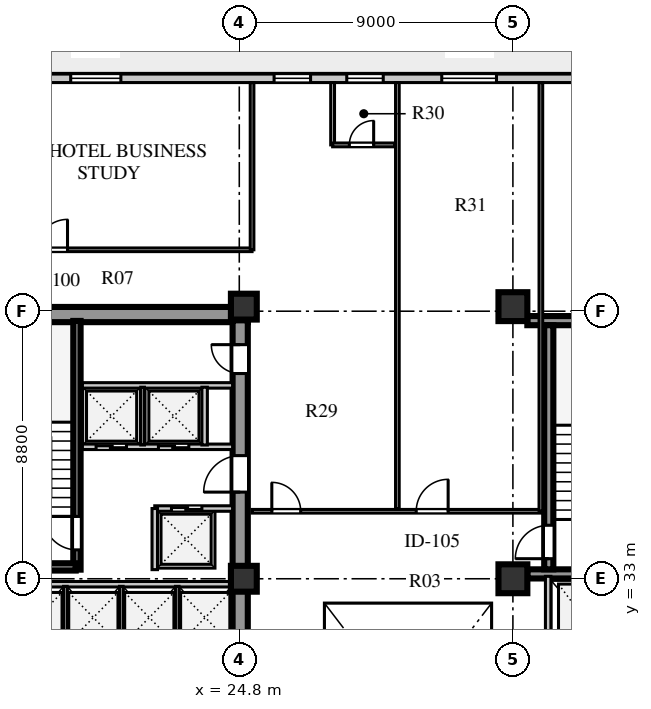
"""IFC4 building model, lengths in metres.
Left out: names, types, materials, properties, quantities, classifications, styles, units other than length and angle.
Written with IfcOpenShell. Run it as: python <this file> out.ifc"""

import sys

from ifc_helpers import new_model, si_unit, direction, frame, frame_2d, origin, origin_2d, place, context, subcontext, project, spatial, rectangle, extrude, element, fill, save


model = new_model("IFC4")
c1 = context("Model", 3, precision=1e-05, world=origin(), true_north=direction((0.0, 1.0)))
c2 = subcontext(c1, "Body", "Model", "MODEL_VIEW")
j1 = project(units=[si_unit("LENGTHUNIT", "METRE"), si_unit("PLANEANGLEUNIT", "RADIAN")], contexts=[c1])
p1 = place(None, origin())
s1 = spatial("IfcSite", under=j1, at=p1, CompositionType="ELEMENT")
p2 = place(p1, origin())
s2 = spatial("IfcBuilding", under=s1, at=p2, CompositionType="ELEMENT")
p3 = place(p2, frame((0.0, 0.0, 173.3)))
s3 = spatial("IfcBuildingStorey", under=s2, at=p3, CompositionType="ELEMENT", Elevation=173.3)
p4 = place(p3, frame((15.4, 41.69, 0.0), z_axis=(0.0, 0.0, 1.0), x_axis=(1.0, 0.0, 0.0)))
e1 = element("IfcWall", 1, at=p4, inside=s3, PredefinedType="SHEAR", context=c2, shape_type="SweptSolid", body=[
    extrude(rectangle(XDim=9.68, YDim=0.5, at=frame_2d((4.84, 0.0))), origin(), (0.0, 0.0, 1.0), 3.6),
])
p5 = place(p3, frame((24.83, 15.74, 0.0), z_axis=(0.0, 0.0, 1.0), x_axis=(0.0, 1.0, 0.0)))
e2 = element("IfcWall", 2, at=p5, inside=s3, PredefinedType="SHEAR", context=c2, shape_type="SweptSolid", body=[
    extrude(rectangle(XDim=25.76, YDim=0.5, at=frame_2d((12.88, 0.0))), origin(), (0.0, 0.0, 1.0), 3.6),
])
p6 = place(p5, frame((1.61, 0.0, 0.0)))
e3 = element("IfcOpeningElement", 3, at=p6, cuts=e2, PredefinedType="OPENING", context=c2, shape_type="SweptSolid", body=[
    extrude(rectangle(XDim=1.2, YDim=2.1, at=frame_2d((0.6, 1.05))), frame((0.0, 0.26, 0.0), z_axis=(0.0, -1.0, 0.0), x_axis=(1.0, 0.0, 0.0)), (0.0, 0.0, 1.0), 0.52),
])
p7 = place(p5, frame((6.78, 0.0, 0.0)))
e4 = element("IfcOpeningElement", 4, at=p7, cuts=e2, PredefinedType="OPENING", context=c2, shape_type="SweptSolid", body=[
    extrude(rectangle(XDim=0.85, YDim=2.06, at=frame_2d((0.425, 1.03))), frame((0.0, 0.26, 0.0), z_axis=(0.0, -1.0, 0.0), x_axis=(1.0, 0.0, 0.0)), (0.0, 0.0, 1.0), 0.52),
])
p8 = place(p5, frame((12.11, 0.0, 0.0)))
e5 = element("IfcOpeningElement", 5, at=p8, cuts=e2, PredefinedType="OPENING", context=c2, shape_type="SweptSolid", body=[
    extrude(rectangle(XDim=1.5, YDim=2.12, at=frame_2d((0.75, 1.06))), frame((0.0, 0.26, 0.0), z_axis=(0.0, -1.0, 0.0), x_axis=(1.0, 0.0, 0.0)), (0.0, 0.0, 1.0), 0.52),
])
p9 = place(p5, frame((20.11, 0.0, 0.0)))
e6 = element("IfcOpeningElement", 6, at=p9, cuts=e2, PredefinedType="OPENING", context=c2, shape_type="SweptSolid", body=[
    extrude(rectangle(XDim=1.2, YDim=2.12, at=frame_2d((0.6, 1.06))), frame((0.0, 0.26, 0.0), z_axis=(0.0, -1.0, 0.0), x_axis=(1.0, 0.0, 0.0)), (0.0, 0.0, 1.0), 0.52),
])
p10 = place(p5, frame((24.01, 0.0, 0.0)))
e7 = element("IfcOpeningElement", 7, at=p10, cuts=e2, PredefinedType="OPENING", context=c2, shape_type="SweptSolid", body=[
    extrude(rectangle(XDim=0.95, YDim=2.1, at=frame_2d((0.475, 1.05))), frame((0.0, 0.26, 0.0), z_axis=(0.0, -1.0, 0.0), x_axis=(1.0, 0.0, 0.0)), (0.0, 0.0, 1.0), 0.52),
])
for number, where, z_axis, x_axis in (
    (8, (34.275, 33.16, 0.0), (0.0, 0.0, 1.0), (1.0, 0.0, 0.0)),
    (9, (34.275, 41.49, 0.0), (0.0, 0.0, 1.0), (1.0, 0.0, 0.0)),
):
    element("IfcWall", number, at=place(p3, frame(where, z_axis=z_axis, x_axis=x_axis)), inside=s3, PredefinedType="SHEAR", context=c2, shape_type="SweptSolid", body=[
        extrude(rectangle(XDim=4.595, YDim=0.3, at=frame_2d((2.298, 0.0))), origin(), (0.0, 0.0, 1.0), 3.6),
    ])
p11 = place(p3, frame((34.98, 33.31, 0.0), z_axis=(0.0, 0.0, 1.0), x_axis=(0.0, 1.0, 0.0)))
e10 = element("IfcWall", 10, at=p11, inside=s3, PredefinedType="SHEAR", context=c2, shape_type="SweptSolid", body=[
    extrude(rectangle(XDim=8.03, YDim=0.3, at=frame_2d((4.015, 0.0))), origin(), (0.0, 0.0, 1.0), 3.6),
])
p12 = place(p11, frame((0.35, 0.0, 0.0)))
e11 = element("IfcOpeningElement", 11, at=p12, cuts=e10, PredefinedType="OPENING", context=c2, shape_type="SweptSolid", body=[
    extrude(rectangle(XDim=1.1, YDim=2.1, at=frame_2d((0.55, 1.05))), frame((0.0, 0.16, 0.0), z_axis=(0.0, -1.0, 0.0), x_axis=(1.0, 0.0, 0.0)), (0.0, 0.0, 1.0), 0.32),
])
for number, where, z_axis, x_axis in (
    (12, (24.95, 33.0, 0.0), (0.0, 0.0, 1.0), (1.0, 0.0, 0.0)),
    (13, (24.95, 41.95, 0.0), (0.0, 0.0, 1.0), (1.0, 0.0, 0.0)),
):
    element("IfcColumn", number, at=place(p3, frame(where, z_axis=z_axis, x_axis=x_axis)), inside=s3, PredefinedType="COLUMN", context=c2, shape_type="SweptSolid", body=[
        extrude(rectangle(XDim=0.85, YDim=0.85, at=origin_2d()), origin(), (0.0, 0.0, 1.0), 3.6),
    ])
for number, where, z_axis, x_axis in (
    (14, (33.8, 33.0, 0.0), (0.0, 0.0, 1.0), (1.0, 0.0, 0.0)),
    (15, (33.8, 41.95, 0.0), (0.0, 0.0, 1.0), (1.0, 0.0, 0.0)),
):
    element("IfcColumn", number, at=place(p3, frame(where, z_axis=z_axis, x_axis=x_axis)), inside=s3, PredefinedType="COLUMN", context=c2, shape_type="SweptSolid", body=[
        extrude(rectangle(XDim=0.95, YDim=0.95, at=origin_2d()), origin(), (0.0, 0.0, 1.0), 3.6),
    ])
p13 = place(p3, frame((45.55, 49.46, 0.0), z_axis=(0.0, 0.0, 1.0), x_axis=(-1.0, 0.0, 0.0)))
e16 = element("IfcWall", 16, at=p13, inside=s3, PredefinedType="STANDARD", context=c2, shape_type="SweptSolid", body=[
    extrude(rectangle(XDim=32.5, YDim=0.28, at=frame_2d((16.25, 0.0))), origin(), (0.0, 0.0, 1.0), 3.6),
])
p14 = place(p13, frame((30.55, 0.0, 0.0)))
e17 = element("IfcOpeningElement", 17, at=p14, cuts=e16, PredefinedType="OPENING", context=c2, shape_type="SweptSolid", body=[
    extrude(rectangle(XDim=1.0, YDim=2.05, at=frame_2d((0.5, 1.025))), frame((0.0, 0.15, 0.0), z_axis=(0.0, -1.0, 0.0), x_axis=(1.0, 0.0, 0.0)), (0.0, 0.0, 1.0), 0.3),
])
p15 = place(p13, frame((24.645, 0.0, 0.8)))
e18 = element("IfcOpeningElement", 18, at=p15, cuts=e16, PredefinedType="OPENING", context=c2, shape_type="SweptSolid", body=[
    extrude(rectangle(XDim=1.65, YDim=1.95, at=frame_2d((0.825, 0.975))), frame((0.0, 0.15, 0.0), z_axis=(0.0, -1.0, 0.0), x_axis=(1.0, 0.0, 0.0)), (0.0, 0.0, 1.0), 0.3),
])
p16 = place(p13, frame((18.405, 0.0, 0.8)))
e19 = element("IfcOpeningElement", 19, at=p16, cuts=e16, PredefinedType="OPENING", context=c2, shape_type="SweptSolid", body=[
    extrude(rectangle(XDim=1.2, YDim=1.75, at=frame_2d((0.6, 0.875))), frame((0.0, 0.15, 0.0), z_axis=(0.0, -1.0, 0.0), x_axis=(1.0, 0.0, 0.0)), (0.0, 0.0, 1.0), 0.3),
])
p17 = place(p13, frame((16.015, 0.0, 0.8)))
e20 = element("IfcOpeningElement", 20, at=p17, cuts=e16, PredefinedType="OPENING", context=c2, shape_type="SweptSolid", body=[
    extrude(rectangle(XDim=1.2, YDim=1.75, at=frame_2d((0.6, 0.875))), frame((0.0, 0.15, 0.0), z_axis=(0.0, -1.0, 0.0), x_axis=(1.0, 0.0, 0.0)), (0.0, 0.0, 1.0), 0.3),
])
p18 = place(p13, frame((12.29, 0.0, 0.8)))
e21 = element("IfcOpeningElement", 21, at=p18, cuts=e16, PredefinedType="OPENING", context=c2, shape_type="SweptSolid", body=[
    extrude(rectangle(XDim=1.8, YDim=2.0, at=frame_2d((0.9, 1.0))), frame((0.0, 0.15, 0.0), z_axis=(0.0, -1.0, 0.0), x_axis=(1.0, 0.0, 0.0)), (0.0, 0.0, 1.0), 0.3),
])
p19 = place(p13, frame((7.03, 0.0, 0.8)))
e22 = element("IfcOpeningElement", 22, at=p19, cuts=e16, PredefinedType="OPENING", context=c2, shape_type="SweptSolid", body=[
    extrude(rectangle(XDim=1.5, YDim=2.0, at=frame_2d((0.75, 1.0))), frame((0.0, 0.15, 0.0), z_axis=(0.0, -1.0, 0.0), x_axis=(1.0, 0.0, 0.0)), (0.0, 0.0, 1.0), 0.3),
])
p20 = place(p13, frame((1.82, 0.0, 0.8)))
e23 = element("IfcOpeningElement", 23, at=p20, cuts=e16, PredefinedType="OPENING", context=c2, shape_type="SweptSolid", body=[
    extrude(rectangle(XDim=1.2, YDim=1.75, at=frame_2d((0.6, 0.875))), frame((0.0, 0.15, 0.0), z_axis=(0.0, -1.0, 0.0), x_axis=(1.0, 0.0, 0.0)), (0.0, 0.0, 1.0), 0.3),
])
p21 = place(p3, frame((15.9, 32.82, 0.0), z_axis=(0.0, 0.0, 1.0), x_axis=(1.0, 0.0, 0.0)))
e24 = element("IfcWall", 24, at=p21, inside=s3, PredefinedType="SOLIDWALL", context=c2, shape_type="SweptSolid", body=[
    extrude(rectangle(XDim=8.68, YDim=0.18, at=frame_2d((4.34, 0.0))), origin(), (0.0, 0.0, 1.0), 2.95),
])
for number, where, z_axis, x_axis in (
    (25, (19.08, 30.7, 0.0), (0.0, 0.0, 1.0), (0.0, 1.0, 0.0)),
    (26, (20.92, 30.7, 0.0), (0.0, 0.0, 1.0), (0.0, 1.0, 0.0)),
    (27, (22.76, 30.7, 0.0), (0.0, 0.0, 1.0), (0.0, 1.0, 0.0)),
):
    element("IfcWall", number, at=place(p3, frame(where, z_axis=z_axis, x_axis=x_axis)), inside=s3, PredefinedType="PARTITIONING", context=c2, shape_type="SweptSolid", body=[
        extrude(rectangle(XDim=2.05, YDim=0.12, at=frame_2d((1.025, 0.0))), origin(), (0.0, 0.0, 1.0), 3.6),
    ])
p22 = place(p3, frame((19.46, 33.3, 0.0), z_axis=(0.0, 0.0, 1.0), x_axis=(0.0, 1.0, 0.0)))
e28 = element("IfcWall", 28, at=p22, inside=s3, PredefinedType="SHEAR", context=c2, shape_type="SweptSolid", body=[
    extrude(rectangle(XDim=8.18, YDim=0.24, at=frame_2d((4.09, 0.0))), origin(), (0.0, 0.0, 1.0), 3.85),
])
p23 = place(p22, frame((0.65, 0.0, 0.0)))
e29 = element("IfcOpeningElement", 29, at=p23, cuts=e28, PredefinedType="OPENING", context=c2, shape_type="SweptSolid", body=[
    extrude(rectangle(XDim=1.1, YDim=2.1, at=frame_2d((0.55, 1.05))), frame((0.0, 0.13, 0.0), z_axis=(0.0, -1.0, 0.0), x_axis=(1.0, 0.0, 0.0)), (0.0, 0.0, 1.0), 0.26),
])
p24 = place(p3, frame((15.9, 33.39, 0.0), z_axis=(0.0, 0.0, 1.0), x_axis=(1.0, 0.0, 0.0)))
e30 = element("IfcWall", 30, at=p24, inside=s3, PredefinedType="SHEAR", context=c2, shape_type="SweptSolid", body=[
    extrude(rectangle(XDim=3.52, YDim=0.24, at=frame_2d((1.76, 0.0))), origin(), (0.0, 0.0, 1.0), 3.85),
])
p25 = place(p3, frame((22.02, 35.31, 0.0), z_axis=(0.0, 0.0, 1.0), x_axis=(1.0, 0.0, 0.0)))
e31 = element("IfcWall", 31, at=p25, inside=s3, PredefinedType="SOLIDWALL", context=c2, shape_type="SweptSolid", body=[
    extrude(rectangle(XDim=2.56, YDim=0.18, at=frame_2d((1.28, 0.0))), origin(), (0.0, 0.0, 1.0), 3.6),
])
p26 = place(p25, frame((0.55, 0.0, 0.0)))
e32 = element("IfcOpeningElement", 32, at=p26, cuts=e31, PredefinedType="OPENING", context=c2, shape_type="SweptSolid", body=[
    extrude(rectangle(XDim=1.0, YDim=2.1, at=frame_2d((0.5, 1.05))), frame((0.0, 0.1, 0.0), z_axis=(0.0, -1.0, 0.0), x_axis=(1.0, 0.0, 0.0)), (0.0, 0.0, 1.0), 0.2),
])
p27 = place(p3, frame((22.02, 33.3, 0.0), z_axis=(0.0, 0.0, 1.0), x_axis=(0.0, 1.0, 0.0)))
e33 = element("IfcWall", 33, at=p27, inside=s3, PredefinedType="SOLIDWALL", context=c2, shape_type="SweptSolid", body=[
    extrude(rectangle(XDim=2.01, YDim=0.18, at=frame_2d((1.005, 0.0))), origin(), (0.0, 0.0, 1.0), 3.6),
])
p28 = place(p3, frame((19.64, 37.34, 0.0), z_axis=(0.0, 0.0, 1.0), x_axis=(1.0, 0.0, 0.0)))
e34 = element("IfcWall", 34, at=p28, inside=s3, PredefinedType="SOLIDWALL", context=c2, shape_type="SweptSolid", body=[
    extrude(rectangle(XDim=4.94, YDim=0.18, at=frame_2d((2.47, 0.0))), origin(), (0.0, 0.0, 1.0), 3.6),
])
p29 = place(p28, frame((0.45, 0.0, 0.0)))
e35 = element("IfcOpeningElement", 35, at=p29, cuts=e34, PredefinedType="OPENING", context=c2, shape_type="SweptSolid", body=[
    extrude(rectangle(XDim=1.0, YDim=2.1, at=frame_2d((0.5, 1.05))), frame((0.0, 0.1, 0.0), z_axis=(0.0, -1.0, 0.0), x_axis=(1.0, 0.0, 0.0)), (0.0, 0.0, 1.0), 0.2),
])
p30 = place(p28, frame((2.5, 0.0, 0.0)))
e36 = element("IfcOpeningElement", 36, at=p30, cuts=e34, PredefinedType="OPENING", context=c2, shape_type="SweptSolid", body=[
    extrude(rectangle(XDim=1.0, YDim=2.1, at=frame_2d((0.5, 1.05))), frame((0.0, 0.1, 0.0), z_axis=(0.0, -1.0, 0.0), x_axis=(1.0, 0.0, 0.0)), (0.0, 0.0, 1.0), 0.2),
])
p31 = place(p3, frame((19.64, 39.36, 0.0), z_axis=(0.0, 0.0, 1.0), x_axis=(1.0, 0.0, 0.0)))
e37 = element("IfcWall", 37, at=p31, inside=s3, PredefinedType="SOLIDWALL", context=c2, shape_type="SweptSolid", body=[
    extrude(rectangle(XDim=4.94, YDim=0.18, at=frame_2d((2.47, 0.0))), origin(), (0.0, 0.0, 1.0), 3.6),
])
p32 = place(p3, frame((21.62, 37.4, 0.0), z_axis=(0.0, 0.0, 1.0), x_axis=(0.0, 1.0, 0.0)))
e38 = element("IfcWall", 38, at=p32, inside=s3, PredefinedType="PARTITIONING", context=c2, shape_type="SweptSolid", body=[
    extrude(rectangle(XDim=1.9, YDim=0.12, at=frame_2d((0.95, 0.0))), origin(), (0.0, 0.0, 1.0), 3.6),
])
p33 = place(p3, frame((23.66, 37.4, 0.0), z_axis=(0.0, 0.0, 1.0), x_axis=(0.0, 1.0, 0.0)))
e39 = element("IfcWall", 39, at=p33, inside=s3, PredefinedType="SOLIDWALL", context=c2, shape_type="SweptSolid", body=[
    extrude(rectangle(XDim=1.9, YDim=0.18, at=frame_2d((0.95, 0.0))), origin(), (0.0, 0.0, 1.0), 3.6),
])
p34 = place(p3, frame((34.96, 28.86, 0.0), z_axis=(0.0, 0.0, 1.0), x_axis=(0.0, 1.0, 0.0)))
e40 = element("IfcWall", 40, at=p34, inside=s3, PredefinedType="SOLIDWALL", context=c2, shape_type="SweptSolid", body=[
    extrude(rectangle(XDim=4.22, YDim=0.18, at=frame_2d((2.11, 0.0))), origin(), (0.0, 0.0, 1.0), 3.6),
])
p35 = place(p3, frame((25.22, 35.22, 0.0), z_axis=(0.0, 0.0, 1.0), x_axis=(1.0, 0.0, 0.0)))
e41 = element("IfcWall", 41, at=p35, inside=s3, PredefinedType="PARTITIONING", context=c2, shape_type="SweptSolid", body=[
    extrude(rectangle(XDim=9.5, YDim=0.12, at=frame_2d((4.75, 0.0))), origin(), (0.0, 0.0, 1.0), 3.6),
])
p36 = place(p35, frame((0.65, 0.0, 0.0)))
e42 = element("IfcOpeningElement", 42, at=p36, cuts=e41, PredefinedType="OPENING", context=c2, shape_type="SweptSolid", body=[
    extrude(rectangle(XDim=0.95, YDim=2.1, at=frame_2d((0.475, 1.05))), frame((0.0, 0.07, 0.0), z_axis=(0.0, -1.0, 0.0), x_axis=(1.0, 0.0, 0.0)), (0.0, 0.0, 1.0), 0.14),
])
p37 = place(p35, frame((5.4, 0.0, 0.0)))
e43 = element("IfcOpeningElement", 43, at=p37, cuts=e41, PredefinedType="OPENING", context=c2, shape_type="SweptSolid", body=[
    extrude(rectangle(XDim=1.05, YDim=2.1, at=frame_2d((0.525, 1.05))), frame((0.0, 0.07, 0.0), z_axis=(0.0, -1.0, 0.0), x_axis=(1.0, 0.0, 0.0)), (0.0, 0.0, 1.0), 0.14),
])
p38 = place(p3, frame((13.39, 43.82, 0.0), z_axis=(0.0, 0.0, 1.0), x_axis=(1.0, 0.0, 0.0)))
e44 = element("IfcWall", 44, at=p38, inside=s3, PredefinedType="PARTITIONING", context=c2, shape_type="SweptSolid", body=[
    extrude(rectangle(XDim=11.83, YDim=0.12, at=frame_2d((5.915, 0.0))), origin(), (0.0, 0.0, 1.0), 3.6),
])
p39 = place(p38, frame((4.76, 0.0, 0.0)))
e45 = element("IfcOpeningElement", 45, at=p39, cuts=e44, PredefinedType="OPENING", context=c2, shape_type="SweptSolid", body=[
    extrude(rectangle(XDim=1.0, YDim=2.08, at=frame_2d((0.5, 1.04))), frame((0.0, 0.07, 0.0), z_axis=(0.0, -1.0, 0.0), x_axis=(1.0, 0.0, 0.0)), (0.0, 0.0, 1.0), 0.14),
])
p40 = place(p3, frame((25.22, 43.82, 0.0), z_axis=(0.0, 0.0, 1.0), x_axis=(0.0, 1.0, 0.0)))
e46 = element("IfcWall", 46, at=p40, inside=s3, PredefinedType="PARTITIONING", context=c2, shape_type="SweptSolid", body=[
    extrude(rectangle(XDim=5.5, YDim=0.12, at=frame_2d((2.75, 0.0))), origin(), (0.0, 0.0, 1.0), 3.15),
])
p41 = place(p3, frame((34.72, 35.22, 0.0), z_axis=(0.0, 0.0, 1.0), x_axis=(0.0, 1.0, 0.0)))
e47 = element("IfcWall", 47, at=p41, inside=s3, PredefinedType="PARTITIONING", context=c2, shape_type="SweptSolid", body=[
    extrude(rectangle(XDim=14.1, YDim=0.12, at=frame_2d((7.05, 0.0))), origin(), (0.0, 0.0, 1.0), 3.6),
])
p42 = place(p3, frame((30.0, 35.3, 0.0), z_axis=(0.0, 0.0, 1.0), x_axis=(0.0, 1.0, 0.0)))
e48 = element("IfcWall", 48, at=p42, inside=s3, PredefinedType="PARTITIONING", context=c2, shape_type="SweptSolid", body=[
    extrude(rectangle(XDim=14.02, YDim=0.12, at=frame_2d((7.01, 0.0))), origin(), (0.0, 0.0, 1.0), 3.6),
])
p43 = place(p3, frame((27.87, 47.27, 0.0), z_axis=(0.0, 0.0, 1.0), x_axis=(0.0, 1.0, 0.0)))
e49 = element("IfcWall", 49, at=p43, inside=s3, PredefinedType="PLUMBINGWALL", context=c2, shape_type="SweptSolid", body=[
    extrude(rectangle(XDim=2.05, YDim=0.125, at=frame_2d((1.025, 0.0))), origin(), (0.0, 0.0, 1.0), 3.6),
])
p44 = place(p3, frame((27.87, 47.27, 0.0), z_axis=(0.0, 0.0, 1.0), x_axis=(1.0, 0.0, 0.0)))
e50 = element("IfcWall", 50, at=p44, inside=s3, PredefinedType="PLUMBINGWALL", context=c2, shape_type="SweptSolid", body=[
    extrude(rectangle(XDim=2.05, YDim=0.125, at=frame_2d((1.025, 0.0))), origin(), (0.0, 0.0, 1.0), 3.6),
])
p45 = place(p44, frame((0.55, 0.0, 0.0)))
e51 = element("IfcOpeningElement", 51, at=p45, cuts=e50, PredefinedType="OPENING", context=c2, shape_type="SweptSolid", body=[
    extrude(rectangle(XDim=0.8, YDim=2.05, at=frame_2d((0.4, 1.025))), frame((0.0, 0.073, 0.0), z_axis=(0.0, -1.0, 0.0), x_axis=(1.0, 0.0, 0.0)), (0.0, 0.0, 1.0), 0.145),
])
p46 = place(p15, origin())
e52 = element("IfcWindow", 52, at=p46, inside=s3, PartitioningType="SINGLE_PANEL", PredefinedType="WINDOW", context=c2, shape_type="SweptSolid", body=[
    extrude(rectangle(XDim=1.65, YDim=1.95, at=frame_2d((0.825, 0.975))), frame((0.0, 0.03, 0.0), z_axis=(0.0, -1.0, 0.0), x_axis=(1.0, 0.0, 0.0)), (0.0, 0.0, 1.0), 0.06),
])
fill(e18, e52)
p47 = place(p16, origin())
e53 = element("IfcWindow", 53, at=p47, inside=s3, PartitioningType="SINGLE_PANEL", PredefinedType="WINDOW", context=c2, shape_type="SweptSolid", body=[
    extrude(rectangle(XDim=1.2, YDim=1.75, at=frame_2d((0.6, 0.875))), frame((0.0, 0.03, 0.0), z_axis=(0.0, -1.0, 0.0), x_axis=(1.0, 0.0, 0.0)), (0.0, 0.0, 1.0), 0.06),
])
fill(e19, e53)
p48 = place(p17, origin())
e54 = element("IfcWindow", 54, at=p48, inside=s3, PartitioningType="SINGLE_PANEL", PredefinedType="WINDOW", context=c2, shape_type="SweptSolid", body=[
    extrude(rectangle(XDim=1.2, YDim=1.75, at=frame_2d((0.6, 0.875))), frame((0.0, 0.03, 0.0), z_axis=(0.0, -1.0, 0.0), x_axis=(1.0, 0.0, 0.0)), (0.0, 0.0, 1.0), 0.06),
])
fill(e20, e54)
p49 = place(p18, origin())
e55 = element("IfcWindow", 55, at=p49, inside=s3, PartitioningType="SINGLE_PANEL", PredefinedType="WINDOW", context=c2, shape_type="SweptSolid", body=[
    extrude(rectangle(XDim=1.8, YDim=2.0, at=frame_2d((0.9, 1.0))), frame((0.0, 0.03, 0.0), z_axis=(0.0, -1.0, 0.0), x_axis=(1.0, 0.0, 0.0)), (0.0, 0.0, 1.0), 0.06),
])
fill(e21, e55)
p50 = place(p23, origin())
e56 = element("IfcDoor", 56, at=p50, inside=s3, OperationType="SINGLE_SWING_RIGHT", PredefinedType="DOOR", context=c2, shape_type="SweptSolid", body=[
    extrude(rectangle(XDim=1.1, YDim=2.1, at=frame_2d((0.55, 1.05))), frame((0.0, 0.025, 0.0), z_axis=(0.0, -1.0, 0.0), x_axis=(1.0, 0.0, 0.0)), (0.0, 0.0, 1.0), 0.05),
])
fill(e29, e56)
p51 = place(p9, frame((1.2, 0.0, 0.0), z_axis=(0.0, 0.0, 1.0), x_axis=(-1.0, 0.0, 0.0)))
e57 = element("IfcDoor", 57, at=p51, inside=s3, OperationType="SINGLE_SWING_RIGHT", PredefinedType="DOOR", context=c2, shape_type="SweptSolid", body=[
    extrude(rectangle(XDim=1.2, YDim=2.12, at=frame_2d((0.6, 1.06))), frame((0.0, 0.025, 0.0), z_axis=(0.0, -1.0, 0.0), x_axis=(1.0, 0.0, 0.0)), (0.0, 0.0, 1.0), 0.05),
])
fill(e6, e57)
p52 = place(p29, frame((1.0, 0.0, 0.0), z_axis=(0.0, 0.0, 1.0), x_axis=(-1.0, 0.0, 0.0)))
e58 = element("IfcDoor", 58, at=p52, inside=s3, OperationType="DOUBLE_DOOR_SLIDING", PredefinedType="DOOR", context=c2, shape_type="SweptSolid", body=[
    extrude(rectangle(XDim=1.0, YDim=2.1, at=frame_2d((0.5, 1.05))), frame((0.0, 0.025, 0.0), z_axis=(0.0, -1.0, 0.0), x_axis=(1.0, 0.0, 0.0)), (0.0, 0.0, 1.0), 0.05),
])
fill(e35, e58)
p53 = place(p30, frame((1.0, 0.0, 0.0), z_axis=(0.0, 0.0, 1.0), x_axis=(-1.0, 0.0, 0.0)))
e59 = element("IfcDoor", 59, at=p53, inside=s3, OperationType="DOUBLE_DOOR_SLIDING", PredefinedType="DOOR", context=c2, shape_type="SweptSolid", body=[
    extrude(rectangle(XDim=1.0, YDim=2.1, at=frame_2d((0.5, 1.05))), frame((0.0, 0.025, 0.0), z_axis=(0.0, -1.0, 0.0), x_axis=(1.0, 0.0, 0.0)), (0.0, 0.0, 1.0), 0.05),
])
fill(e36, e59)
p54 = place(p26, origin())
e60 = element("IfcDoor", 60, at=p54, inside=s3, OperationType="DOUBLE_DOOR_SLIDING", PredefinedType="DOOR", context=c2, shape_type="SweptSolid", body=[
    extrude(rectangle(XDim=1.0, YDim=2.1, at=frame_2d((0.5, 1.05))), frame((0.0, 0.025, 0.0), z_axis=(0.0, -1.0, 0.0), x_axis=(1.0, 0.0, 0.0)), (0.0, 0.0, 1.0), 0.05),
])
fill(e32, e60)
p55 = place(p10, frame((0.95, 0.0, 0.0), z_axis=(0.0, 0.0, 1.0), x_axis=(-1.0, 0.0, 0.0)))
e61 = element("IfcDoor", 61, at=p55, inside=s3, OperationType="SINGLE_SWING_LEFT", PredefinedType="DOOR", context=c2, shape_type="SweptSolid", body=[
    extrude(rectangle(XDim=0.95, YDim=2.1, at=frame_2d((0.475, 1.05))), frame((0.0, 0.025, 0.0), z_axis=(0.0, -1.0, 0.0), x_axis=(1.0, 0.0, 0.0)), (0.0, 0.0, 1.0), 0.05),
])
fill(e7, e61)
p56 = place(p12, origin())
e62 = element("IfcDoor", 62, at=p56, inside=s3, OperationType="SINGLE_SWING_LEFT", PredefinedType="DOOR", context=c2, shape_type="SweptSolid", body=[
    extrude(rectangle(XDim=1.1, YDim=2.1, at=frame_2d((0.55, 1.05))), frame((0.0, 0.025, 0.0), z_axis=(0.0, -1.0, 0.0), x_axis=(1.0, 0.0, 0.0)), (0.0, 0.0, 1.0), 0.05),
])
fill(e11, e62)
p57 = place(p39, origin())
e63 = element("IfcDoor", 63, at=p57, inside=s3, OperationType="SINGLE_SWING_RIGHT", PredefinedType="DOOR", context=c2, shape_type="SweptSolid", body=[
    extrude(rectangle(XDim=1.0, YDim=2.08, at=frame_2d((0.5, 1.04))), frame((0.0, 0.025, 0.0), z_axis=(0.0, -1.0, 0.0), x_axis=(1.0, 0.0, 0.0)), (0.0, 0.0, 1.0), 0.05),
])
fill(e45, e63)
p58 = place(p36, origin())
e64 = element("IfcDoor", 64, at=p58, inside=s3, OperationType="SINGLE_SWING_LEFT", PredefinedType="DOOR", context=c2, shape_type="SweptSolid", body=[
    extrude(rectangle(XDim=0.95, YDim=2.1, at=frame_2d((0.475, 1.05))), frame((0.0, 0.025, 0.0), z_axis=(0.0, -1.0, 0.0), x_axis=(1.0, 0.0, 0.0)), (0.0, 0.0, 1.0), 0.05),
])
fill(e42, e64)
p59 = place(p45, frame((0.8, 0.0, 0.0), z_axis=(0.0, 0.0, 1.0), x_axis=(-1.0, 0.0, 0.0)))
e65 = element("IfcDoor", 65, at=p59, inside=s3, OperationType="SINGLE_SWING_LEFT", PredefinedType="DOOR", context=c2, shape_type="SweptSolid", body=[
    extrude(rectangle(XDim=0.8, YDim=2.05, at=frame_2d((0.4, 1.025))), frame((0.0, 0.025, 0.0), z_axis=(0.0, -1.0, 0.0), x_axis=(1.0, 0.0, 0.0)), (0.0, 0.0, 1.0), 0.05),
])
fill(e51, e65)
p60 = place(p37, origin())
e66 = element("IfcDoor", 66, at=p60, inside=s3, OperationType="SINGLE_SWING_RIGHT", PredefinedType="DOOR", context=c2, shape_type="SweptSolid", body=[
    extrude(rectangle(XDim=1.05, YDim=2.1, at=frame_2d((0.525, 1.05))), frame((0.0, 0.025, 0.0), z_axis=(0.0, -1.0, 0.0), x_axis=(1.0, 0.0, 0.0)), (0.0, 0.0, 1.0), 0.05),
])
fill(e43, e66)
save(model, sys.argv[1])
